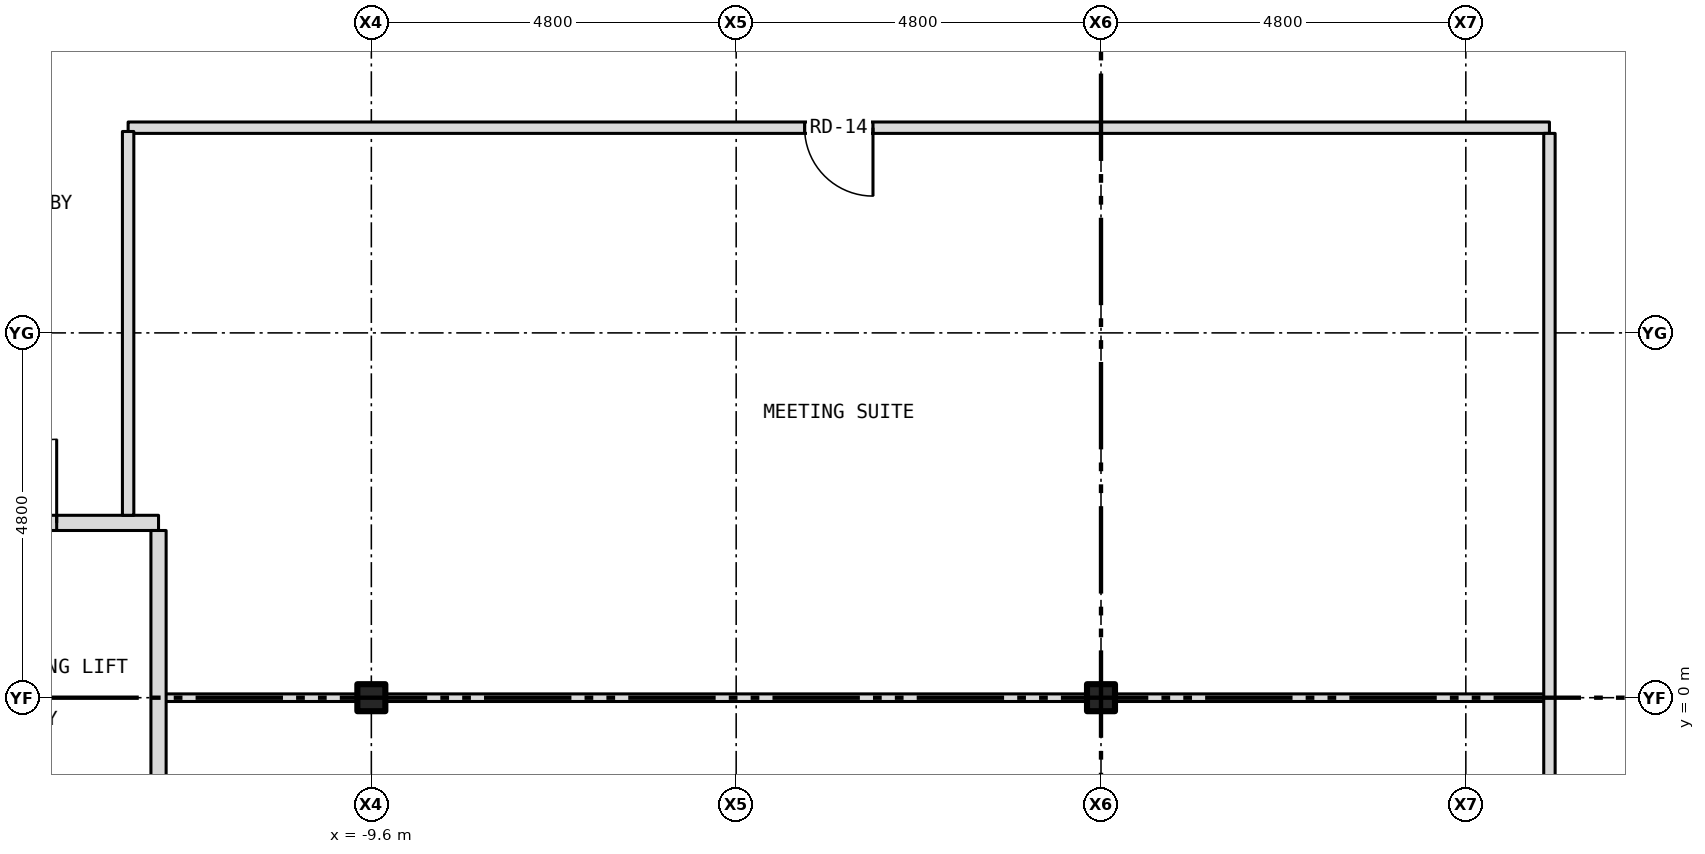
"""IFC4 building model, lengths in metres.
Left out: names, types, materials, properties, quantities, classifications, styles, units other than length and angle.
Written with IfcOpenShell. Run it as: python <this file> out.ifc"""

import sys

from ifc_helpers import new_model, si_unit, direction, frame, frame_2d, origin, origin_2d, place, context, subcontext, project, spatial, rectangle, i_section, extrude, element, fill, save


model = new_model("IFC4")
c1 = context("Model", 3, precision=1e-05, world=origin(), true_north=direction((0.0, 1.0)))
c2 = subcontext(c1, "Body", "Model", "MODEL_VIEW")
j1 = project(units=[si_unit("LENGTHUNIT", "METRE"), si_unit("PLANEANGLEUNIT", "RADIAN")], contexts=[c1])
p1 = place(None, origin())
s1 = spatial("IfcSite", under=j1, at=p1, CompositionType="ELEMENT")
p2 = place(p1, origin())
s2 = spatial("IfcBuilding", under=s1, at=p2, CompositionType="ELEMENT")
p3 = place(p2, frame((0.0, 0.0, 262.0)))
s3 = spatial("IfcBuildingStorey", under=s2, at=p3, CompositionType="ELEMENT", Elevation=262.0)
for number, where, z_axis, x_axis in (
    (1, (-9.6, 0.0, -0.15), (0.0, 0.0, 1.0), (1.0, 0.0, 0.0)),
    (2, (0.0, 0.0, -0.15), (0.0, 0.0, 1.0), (1.0, 0.0, 0.0)),
):
    element("IfcColumn", number, at=place(p3, frame(where, z_axis=z_axis, x_axis=x_axis)), inside=s3, PredefinedType="COLUMN", context=c2, shape_type="SweptSolid", body=[
        extrude(i_section(OverallWidth=0.368, OverallDepth=0.356, WebThickness=0.011, FlangeThickness=0.018, at=origin_2d()), origin(), (0.0, 0.0, 1.0), 3.4),
    ])
p4 = place(p3, frame((-12.4, 0.0, 0.0), z_axis=(0.0, 0.0, 1.0), x_axis=(1.0, 0.0, 0.0)))
e3 = element("IfcWall", 3, at=p4, inside=s3, PredefinedType="PARTITIONING", context=c2, shape_type="SweptSolid", body=[
    extrude(rectangle(XDim=2.616, YDim=0.1, at=frame_2d((1.308, 0.0))), origin(), (0.0, 0.0, 1.0), 2.16),
])
p5 = place(p3, frame((-9.784, 0.0, 0.0), z_axis=(0.0, 0.0, 1.0), x_axis=(1.0, 0.0, 0.0)))
e4 = element("IfcWall", 4, at=p5, inside=s3, PredefinedType="PARTITIONING", context=c2, shape_type="SweptSolid", body=[
    extrude(rectangle(XDim=0.368, YDim=0.1, at=frame_2d((0.184, 0.0))), origin(), (0.0, 0.0, 1.0), 3.25),
])
p6 = place(p3, frame((-9.416, 0.0, 0.0), z_axis=(0.0, 0.0, 1.0), x_axis=(1.0, 0.0, 0.0)))
e5 = element("IfcWall", 5, at=p6, inside=s3, PredefinedType="PARTITIONING", context=c2, shape_type="SweptSolid", body=[
    extrude(rectangle(XDim=9.232, YDim=0.1, at=frame_2d((4.616, 0.0))), origin(), (0.0, 0.0, 1.0), 2.16),
])
p7 = place(p3, frame((-0.184, 0.0, 0.0), z_axis=(0.0, 0.0, 1.0), x_axis=(1.0, 0.0, 0.0)))
e6 = element("IfcWall", 6, at=p7, inside=s3, PredefinedType="PARTITIONING", context=c2, shape_type="SweptSolid", body=[
    extrude(rectangle(XDim=0.368, YDim=0.1, at=frame_2d((0.184, 0.0))), origin(), (0.0, 0.0, 1.0), 3.25),
])
p8 = place(p3, frame((0.184, 0.0, 0.0), z_axis=(0.0, 0.0, 1.0), x_axis=(1.0, 0.0, 0.0)))
e7 = element("IfcWall", 7, at=p8, inside=s3, PredefinedType="PARTITIONING", context=c2, shape_type="SweptSolid", body=[
    extrude(rectangle(XDim=5.716, YDim=0.1, at=frame_2d((2.858, 0.0))), origin(), (0.0, 0.0, 1.0), 2.16),
])
p9 = place(p3, frame((-15.68, 2.3, 0.0), z_axis=(0.0, 0.0, 1.0), x_axis=(1.0, 0.0, 0.0)))
e8 = element("IfcWall", 8, at=p9, inside=s3, PredefinedType="PARTITIONING", context=c2, shape_type="SweptSolid", body=[
    extrude(rectangle(XDim=3.28, YDim=0.2, at=frame_2d((1.64, 0.0))), origin(), (0.0, 0.0, 1.0), 3.25),
])
p10 = place(p9, frame((0.84, 0.0, 0.0)))
e9 = element("IfcOpeningElement", 9, at=p10, cuts=e8, PredefinedType="OPENING", context=c2, shape_type="SweptSolid", body=[
    extrude(rectangle(XDim=1.1, YDim=2.1, at=frame_2d((0.55, 1.05))), frame((0.0, 0.112, 0.0), z_axis=(0.0, -1.0, 0.0), x_axis=(1.0, 0.0, 0.0)), (0.0, 0.0, 1.0), 0.224),
])
p11 = place(p3, frame((-12.8, 7.5, 0.0), z_axis=(0.0, 0.0, 1.0), x_axis=(1.0, 0.0, 0.0)))
e10 = element("IfcWall", 10, at=p11, inside=s3, PredefinedType="PARTITIONING", context=c2, shape_type="SweptSolid", body=[
    extrude(rectangle(XDim=18.7, YDim=0.15, at=frame_2d((9.35, 0.0))), origin(), (0.0, 0.0, 1.0), 3.25),
])
p12 = place(p11, frame((8.9, 0.0, 0.0)))
e11 = element("IfcOpeningElement", 11, at=p12, cuts=e10, PredefinedType="OPENING", context=c2, shape_type="SweptSolid", body=[
    extrude(rectangle(XDim=0.9, YDim=2.1, at=frame_2d((0.45, 1.05))), frame((0.0, 0.087, 0.0), z_axis=(0.0, -1.0, 0.0), x_axis=(1.0, 0.0, 0.0)), (0.0, 0.0, 1.0), 0.174),
])
p13 = place(p3, frame((-12.8, 2.4, 0.0), z_axis=(0.0, 0.0, 1.0), x_axis=(0.0, 1.0, 0.0)))
e12 = element("IfcWall", 12, at=p13, inside=s3, PredefinedType="PARTITIONING", context=c2, shape_type="SweptSolid", body=[
    extrude(rectangle(XDim=5.05, YDim=0.15, at=frame_2d((2.525, 0.0))), origin(), (0.0, 0.0, 1.0), 3.25),
])
p14 = place(p3, frame((-12.4, -1.8, 0.0), z_axis=(0.0, 0.0, 1.0), x_axis=(0.0, 1.0, 0.0)))
e13 = element("IfcWall", 13, at=p14, inside=s3, PredefinedType="PARTITIONING", context=c2, shape_type="SweptSolid", body=[
    extrude(rectangle(XDim=4.0, YDim=0.2, at=frame_2d((2.0, 0.0))), origin(), (0.0, 0.0, 1.0), 3.25),
])
p15 = place(p3, frame((5.9, -10.525, 0.0), z_axis=(0.0, 0.0, 1.0), x_axis=(0.0, 1.0, 0.0)))
e14 = element("IfcWall", 14, at=p15, inside=s3, PredefinedType="PARTITIONING", context=c2, shape_type="SweptSolid", body=[
    extrude(rectangle(XDim=17.95, YDim=0.15, at=frame_2d((8.975, 0.0))), origin(), (0.0, 0.0, 1.0), 3.25),
])
p16 = place(p10, origin())
e15 = element("IfcDoor", 15, at=p16, inside=s3, OperationType="SINGLE_SWING_RIGHT", PredefinedType="DOOR", context=c2, shape_type="SweptSolid", body=[
    extrude(rectangle(XDim=1.1, YDim=2.1, at=frame_2d((0.55, 1.05))), frame((0.0, 0.025, 0.0), z_axis=(0.0, -1.0, 0.0), x_axis=(1.0, 0.0, 0.0)), (0.0, 0.0, 1.0), 0.05),
])
fill(e9, e15)
p17 = place(p12, origin())
e16 = element("IfcDoor", 16, at=p17, inside=s3, OperationType="SINGLE_SWING_RIGHT", PredefinedType="DOOR", context=c2, shape_type="SweptSolid", body=[
    extrude(rectangle(XDim=0.9, YDim=2.1, at=frame_2d((0.45, 1.05))), frame((0.0, 0.025, 0.0), z_axis=(0.0, -1.0, 0.0), x_axis=(1.0, 0.0, 0.0)), (0.0, 0.0, 1.0), 0.05),
])
fill(e11, e16)
save(model, sys.argv[1])
